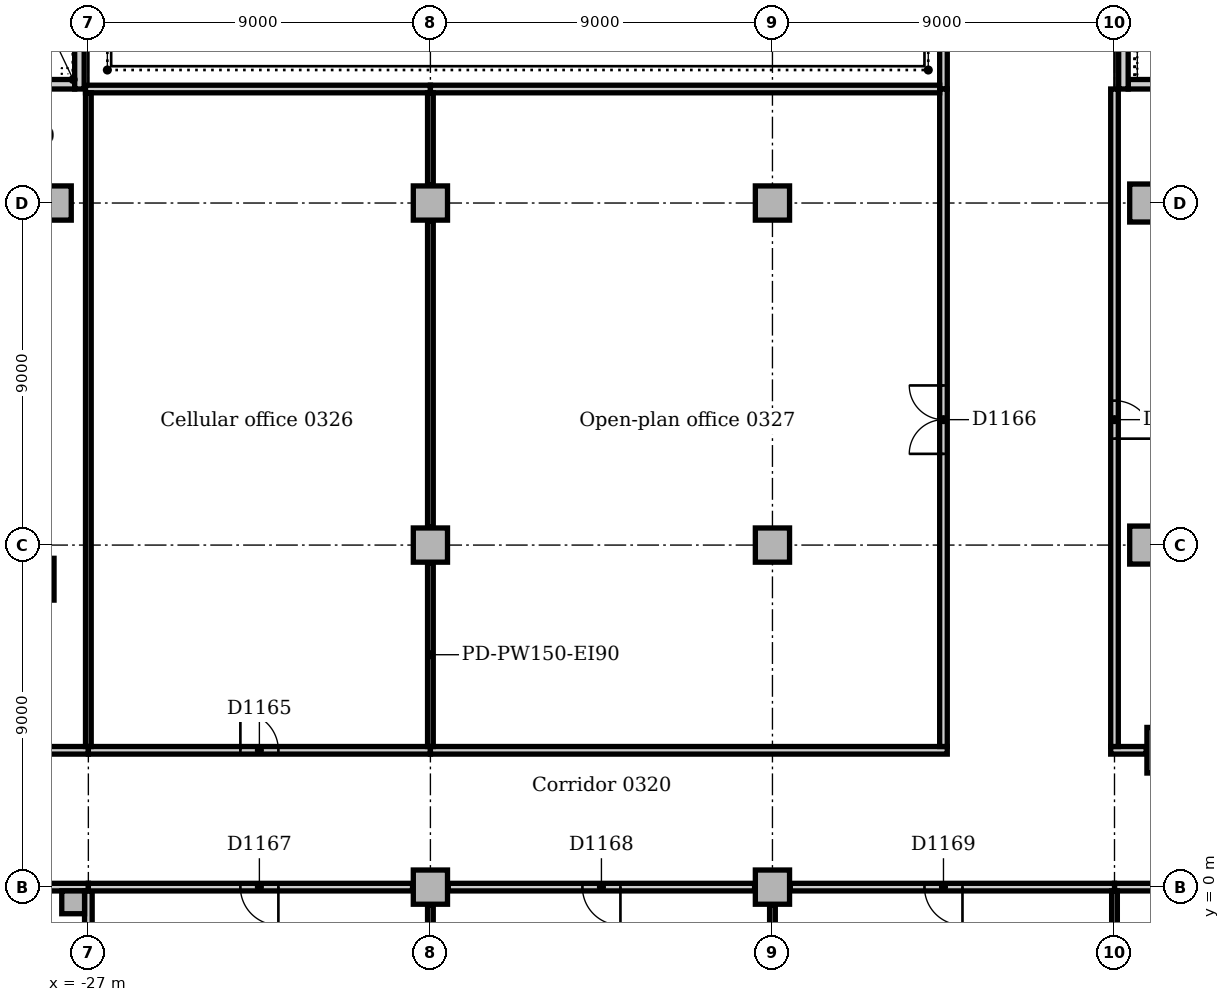
"""IFC4 building model, lengths in metres.
Left out: names, types, materials, properties, quantities, classifications, styles, units other than length and angle.
Written with IfcOpenShell. Run it as: python <this file> out.ifc"""

import sys

from ifc_helpers import new_model, si_unit, direction, frame, frame_2d, origin, origin_with_axes, origin_2d, place, context, subcontext, project, spatial, rectangle, extrude, element, fill, save


model = new_model("IFC4")
c1 = context("Model", 3, precision=1e-05, world=origin(), true_north=direction((0.0, 1.0)))
c2 = subcontext(c1, "Body", "Model", "MODEL_VIEW")
j1 = project(units=[si_unit("LENGTHUNIT", "METRE"), si_unit("PLANEANGLEUNIT", "RADIAN")], contexts=[c1])
p1 = place(None, origin())
s1 = spatial("IfcSite", under=j1, at=p1, CompositionType="ELEMENT")
p2 = place(p1, origin())
s2 = spatial("IfcBuilding", under=s1, at=p2, CompositionType="ELEMENT")
p3 = place(p2, frame((0.0, 0.0, 16.0)))
s3 = spatial("IfcBuildingStorey", under=s2, at=p3, CompositionType="ELEMENT", Elevation=16.0)
p4 = place(p3, frame((0.36, 21.125, 0.0), z_axis=(0.0, 0.0, 1.0), x_axis=(1.0, 0.0, 0.0)))
e1 = element("IfcWall", 1, at=p4, inside=s3, PredefinedType="SOLIDWALL", context=c2, shape_type="SweptSolid", body=[
    extrude(rectangle(XDim=3.54, YDim=0.25, at=frame_2d((1.77, 0.0))), origin(), (0.0, 0.0, 1.0), 5.0),
])
p5 = place(p3, frame((0.235, 21.0, 0.0), z_axis=(0.0, 0.0, 1.0), x_axis=(0.0, 1.0, 0.0)))
e2 = element("IfcWall", 2, at=p5, inside=s3, PredefinedType="SOLIDWALL", context=c2, shape_type="SweptSolid", body=[
    extrude(rectangle(XDim=21.0, YDim=0.25, at=frame_2d((10.5, 0.0))), origin(), (0.0, 0.0, 1.0), 5.0),
])
p6 = place(p3, frame((1.453, 3.602, 0.0), z_axis=(0.0, 0.0, 1.0), x_axis=(1.0, 0.0, 0.0)))
e3 = element("IfcColumn", 3, at=p6, inside=s3, PredefinedType="COLUMN", context=c2, shape_type="SweptSolid", body=[
    extrude(rectangle(XDim=1.2, YDim=1.2, at=origin_2d()), origin(), (0.0, 0.0, 1.0), 4.7),
])
for number, where, z_axis, x_axis in (
    (4, (0.9, 9.0, 0.0), (0.0, 0.0, 1.0), (1.0, 0.0, 0.0)),
    (5, (0.9, 18.0, 0.0), (0.0, 0.0, 1.0), (1.0, 0.0, 0.0)),
):
    element("IfcColumn", number, at=place(p3, frame(where, z_axis=z_axis, x_axis=x_axis)), inside=s3, PredefinedType="COLUMN", context=c2, shape_type="SweptSolid", body=[
        extrude(rectangle(XDim=1.0, YDim=1.0, at=origin_2d()), origin(), (0.0, 0.0, 1.0), 4.7),
    ])
p7 = place(p3, frame((-30.9, 21.125, 0.0), z_axis=(0.0, 0.0, 1.0), x_axis=(1.0, 0.0, 0.0)))
e6 = element("IfcWall", 6, at=p7, inside=s3, PredefinedType="SOLIDWALL", context=c2, shape_type="SweptSolid", body=[
    extrude(rectangle(XDim=3.54, YDim=0.25, at=frame_2d((1.77, 0.0))), origin(), (0.0, 0.0, 1.0), 5.0),
])
p8 = place(p3, frame((-27.235, 21.0, 0.0), z_axis=(0.0, 0.0, 1.0), x_axis=(0.0, 1.0, 0.0)))
e7 = element("IfcWall", 7, at=p8, inside=s3, PredefinedType="SOLIDWALL", context=c2, shape_type="SweptSolid", body=[
    extrude(rectangle(XDim=6.65, YDim=0.25, at=frame_2d((3.325, 0.0))), origin(), (0.0, 0.0, 1.0), 5.0),
])
p9 = place(p3, frame((-28.453, 8.102, 0.0), z_axis=(0.0, 0.0, 1.0), x_axis=(1.0, 0.0, 0.0)))
e8 = element("IfcColumn", 8, at=p9, inside=s3, PredefinedType="COLUMN", context=c2, shape_type="SweptSolid", body=[
    extrude(rectangle(XDim=1.1, YDim=1.1, at=origin_2d()), origin(), (0.0, 0.0, 1.0), 4.7),
])
for number, where, z_axis, x_axis in (
    (9, (-27.9, 18.0, 0.0), (0.0, 0.0, 1.0), (1.0, 0.0, 0.0)),
    (10, (-18.0, 0.0, 0.0), (0.0, 0.0, 1.0), (1.0, 0.0, 0.0)),
    (11, (-18.0, 9.0, 0.0), (0.0, 0.0, 1.0), (1.0, 0.0, 0.0)),
    (12, (-18.0, 18.0, 0.0), (0.0, 0.0, 1.0), (1.0, 0.0, 0.0)),
    (13, (-9.0, 0.0, 0.0), (0.0, 0.0, 1.0), (1.0, 0.0, 0.0)),
    (14, (-9.0, 9.0, 0.0), (0.0, 0.0, 1.0), (1.0, 0.0, 0.0)),
    (15, (-9.0, 18.0, 0.0), (0.0, 0.0, 1.0), (1.0, 0.0, 0.0)),
):
    element("IfcColumn", number, at=place(p3, frame(where, z_axis=z_axis, x_axis=x_axis)), inside=s3, PredefinedType="COLUMN", context=c2, shape_type="SweptSolid", body=[
        extrude(rectangle(XDim=0.9, YDim=0.9, at=origin_2d()), origin(), (0.0, 0.0, 1.0), 4.7),
    ])
p10 = place(p3, frame((-27.4, -0.4, 0.0), z_axis=(0.0, 0.0, 1.0), x_axis=(1.0, 0.0, 0.0)))
e16 = element("IfcColumn", 16, at=p10, inside=s3, PredefinedType="COLUMN", context=c2, shape_type="SweptSolid", body=[
    extrude(rectangle(XDim=0.6, YDim=0.6, at=origin_2d()), origin(), (0.0, 0.0, 1.0), 5.0),
])
p11 = place(p3, frame((-36.0, 0.0, 0.0), z_axis=(0.0, 0.0, 1.0), x_axis=(1.0, 0.0, 0.0)))
e17 = element("IfcWall", 17, at=p11, inside=s3, PredefinedType="SOLIDWALL", context=c2, shape_type="SweptSolid", body=[
    extrude(rectangle(XDim=9.0, YDim=0.2, at=frame_2d((4.5, 0.0))), origin(), (0.0, 0.0, 1.0), 4.7),
])
p12 = place(p11, frame((0.8, 0.0, 0.0)))
e18 = element("IfcOpeningElement", 18, at=p12, cuts=e17, PredefinedType="OPENING", context=c2, shape_type="SweptSolid", body=[
    extrude(rectangle(XDim=1.2, YDim=2.1, at=frame_2d((0.6, 1.05))), frame((0.0, 0.11, 0.0), z_axis=(0.0, -1.0, 0.0), x_axis=(1.0, 0.0, 0.0)), (0.0, 0.0, 1.0), 0.22),
])
p13 = place(p3, frame((-27.0, -4.65, 0.0), z_axis=(0.0, 0.0, 1.0), x_axis=(0.0, 1.0, 0.0)))
e19 = element("IfcWall", 19, at=p13, inside=s3, PredefinedType="SOLIDWALL", context=c2, shape_type="SweptSolid", body=[
    extrude(rectangle(XDim=4.55, YDim=0.2, at=frame_2d((2.275, 0.0))), origin(), (0.0, 0.0, 1.0), 4.7),
])
p14 = place(p3, frame((-36.0, 3.6, 0.0), z_axis=(0.0, 0.0, 1.0), x_axis=(1.0, 0.0, 0.0)))
e20 = element("IfcWall", 20, at=p14, inside=s3, PredefinedType="PARTITIONING", context=c2, shape_type="SweptSolid", body=[
    extrude(rectangle(XDim=9.0, YDim=0.2, at=frame_2d((4.5, 0.0))), origin(), (0.0, 0.0, 1.0), 4.7),
])
p15 = place(p14, frame((4.0, 0.0, 0.0)))
e21 = element("IfcOpeningElement", 21, at=p15, cuts=e20, PredefinedType="OPENING", context=c2, shape_type="SweptSolid", body=[
    extrude(rectangle(XDim=1.0, YDim=2.1, at=frame_2d((0.5, 1.05))), frame((0.0, 0.11, 0.0), z_axis=(0.0, -1.0, 0.0), x_axis=(1.0, 0.0, 0.0)), (0.0, 0.0, 1.0), 0.22),
])
p16 = place(p3, origin_with_axes())
e22 = element("IfcWall", 22, at=p16, inside=s3, PredefinedType="PARTITIONING", context=c2, shape_type="SweptSolid", body=[
    extrude(rectangle(XDim=9.0, YDim=0.2, at=frame_2d((4.5, 0.0))), origin(), (0.0, 0.0, 1.0), 4.7),
])
p17 = place(p16, frame((4.3, 0.0, 0.0)))
e23 = element("IfcOpeningElement", 23, at=p17, cuts=e22, PredefinedType="OPENING", context=c2, shape_type="SweptSolid", body=[
    extrude(rectangle(XDim=1.0, YDim=2.1, at=frame_2d((0.5, 1.05))), frame((0.0, 0.11, 0.0), z_axis=(0.0, -1.0, 0.0), x_axis=(1.0, 0.0, 0.0)), (0.0, 0.0, 1.0), 0.22),
])
p18 = place(p3, frame((-0.1, 3.6, 0.0), z_axis=(0.0, 0.0, 1.0), x_axis=(1.0, 0.0, 0.0)))
e24 = element("IfcWall", 24, at=p18, inside=s3, PredefinedType="PARTITIONING", context=c2, shape_type="SweptSolid", body=[
    extrude(rectangle(XDim=0.933, YDim=0.2, at=frame_2d((0.467, 0.0))), origin(), (0.0, 0.0, 1.0), 4.7),
])
p19 = place(p3, frame((-27.0, 3.6, 0.0), z_axis=(0.0, 0.0, 1.0), x_axis=(1.0, 0.0, 0.0)))
e25 = element("IfcWall", 25, at=p19, inside=s3, PredefinedType="PARTITIONING", context=c2, shape_type="SweptSolid", body=[
    extrude(rectangle(XDim=9.0, YDim=0.2, at=frame_2d((4.5, 0.0))), origin(), (0.0, 0.0, 1.0), 4.7),
])
p20 = place(p19, frame((4.0, 0.0, 0.0)))
e26 = element("IfcOpeningElement", 26, at=p20, cuts=e25, PredefinedType="OPENING", context=c2, shape_type="SweptSolid", body=[
    extrude(rectangle(XDim=1.0, YDim=2.1, at=frame_2d((0.5, 1.05))), frame((0.0, 0.11, 0.0), z_axis=(0.0, -1.0, 0.0), x_axis=(1.0, 0.0, 0.0)), (0.0, 0.0, 1.0), 0.22),
])
p21 = place(p3, frame((-18.0, 3.6, 0.0), z_axis=(0.0, 0.0, 1.0), x_axis=(1.0, 0.0, 0.0)))
e27 = element("IfcWall", 27, at=p21, inside=s3, PredefinedType="PARTITIONING", context=c2, shape_type="SweptSolid", body=[
    extrude(rectangle(XDim=13.6, YDim=0.2, at=frame_2d((6.8, 0.0))), origin(), (0.0, 0.0, 1.0), 4.7),
])
p22 = place(p3, frame((-27.0, 0.0, 0.0), z_axis=(0.0, 0.0, 1.0), x_axis=(1.0, 0.0, 0.0)))
e28 = element("IfcWall", 28, at=p22, inside=s3, PredefinedType="PARTITIONING", context=c2, shape_type="SweptSolid", body=[
    extrude(rectangle(XDim=8.53, YDim=0.2, at=frame_2d((4.265, 0.0))), origin(), (0.0, 0.0, 1.0), 4.7),
])
p23 = place(p22, frame((4.0, 0.0, 0.0)))
e29 = element("IfcOpeningElement", 29, at=p23, cuts=e28, PredefinedType="OPENING", context=c2, shape_type="SweptSolid", body=[
    extrude(rectangle(XDim=1.0, YDim=2.1, at=frame_2d((0.5, 1.05))), frame((0.0, 0.11, 0.0), z_axis=(0.0, -1.0, 0.0), x_axis=(1.0, 0.0, 0.0)), (0.0, 0.0, 1.0), 0.22),
])
p24 = place(p3, frame((-17.53, 0.0, 0.0), z_axis=(0.0, 0.0, 1.0), x_axis=(1.0, 0.0, 0.0)))
e30 = element("IfcWall", 30, at=p24, inside=s3, PredefinedType="PARTITIONING", context=c2, shape_type="SweptSolid", body=[
    extrude(rectangle(XDim=8.06, YDim=0.2, at=frame_2d((4.03, 0.0))), origin(), (0.0, 0.0, 1.0), 4.7),
])
p25 = place(p24, frame((3.53, 0.0, 0.0)))
e31 = element("IfcOpeningElement", 31, at=p25, cuts=e30, PredefinedType="OPENING", context=c2, shape_type="SweptSolid", body=[
    extrude(rectangle(XDim=1.0, YDim=2.1, at=frame_2d((0.5, 1.05))), frame((0.0, 0.11, 0.0), z_axis=(0.0, -1.0, 0.0), x_axis=(1.0, 0.0, 0.0)), (0.0, 0.0, 1.0), 0.22),
])
p26 = place(p3, frame((-8.53, 0.0, 0.0), z_axis=(0.0, 0.0, 1.0), x_axis=(1.0, 0.0, 0.0)))
e32 = element("IfcWall", 32, at=p26, inside=s3, PredefinedType="PARTITIONING", context=c2, shape_type="SweptSolid", body=[
    extrude(rectangle(XDim=8.53, YDim=0.2, at=frame_2d((4.265, 0.0))), origin(), (0.0, 0.0, 1.0), 4.7),
])
p27 = place(p26, frame((3.53, 0.0, 0.0)))
e33 = element("IfcOpeningElement", 33, at=p27, cuts=e32, PredefinedType="OPENING", context=c2, shape_type="SweptSolid", body=[
    extrude(rectangle(XDim=1.0, YDim=2.1, at=frame_2d((0.5, 1.05))), frame((0.0, 0.11, 0.0), z_axis=(0.0, -1.0, 0.0), x_axis=(1.0, 0.0, 0.0)), (0.0, 0.0, 1.0), 0.22),
])
p28 = place(p3, frame((-4.5, 21.0, 0.0), z_axis=(0.0, 0.0, 1.0), x_axis=(0.0, 1.0, 0.0)))
e34 = element("IfcWall", 34, at=p28, inside=s3, PredefinedType="PARTITIONING", context=c2, shape_type="SweptSolid", body=[
    extrude(rectangle(XDim=24.0, YDim=0.2, at=frame_2d((12.0, 0.0))), origin(), (0.0, 0.0, 1.0), 4.7),
])
p29 = place(p3, frame((-4.5, 3.7, 0.0), z_axis=(0.0, 0.0, 1.0), x_axis=(0.0, 1.0, 0.0)))
e35 = element("IfcWall", 35, at=p29, inside=s3, PredefinedType="PARTITIONING", context=c2, shape_type="SweptSolid", body=[
    extrude(rectangle(XDim=17.3, YDim=0.2, at=frame_2d((8.65, 0.0))), origin(), (0.0, 0.0, 1.0), 4.7),
])
p30 = place(p29, frame((7.7, 0.0, 0.0)))
e36 = element("IfcOpeningElement", 36, at=p30, cuts=e35, PredefinedType="OPENING", context=c2, shape_type="SweptSolid", body=[
    extrude(rectangle(XDim=1.8, YDim=2.1, at=frame_2d((0.9, 1.05))), frame((0.0, 0.11, 0.0), z_axis=(0.0, -1.0, 0.0), x_axis=(1.0, 0.0, 0.0)), (0.0, 0.0, 1.0), 0.22),
])
p31 = place(p3, frame((0.0, 3.7, 0.0), z_axis=(0.0, 0.0, 1.0), x_axis=(0.0, 1.0, 0.0)))
e37 = element("IfcWall", 37, at=p31, inside=s3, PredefinedType="PARTITIONING", context=c2, shape_type="SweptSolid", body=[
    extrude(rectangle(XDim=17.3, YDim=0.2, at=frame_2d((8.65, 0.0))), origin(), (0.0, 0.0, 1.0), 4.7),
])
p32 = place(p31, frame((8.1, 0.0, 0.0)))
e38 = element("IfcOpeningElement", 38, at=p32, cuts=e37, PredefinedType="OPENING", context=c2, shape_type="SweptSolid", body=[
    extrude(rectangle(XDim=1.0, YDim=2.1, at=frame_2d((0.5, 1.05))), frame((0.0, 0.11, 0.0), z_axis=(0.0, -1.0, 0.0), x_axis=(1.0, 0.0, 0.0)), (0.0, 0.0, 1.0), 0.22),
])
p33 = place(p3, frame((-27.075, 21.0, 0.0), z_axis=(0.0, 0.0, 1.0), x_axis=(1.0, 0.0, 0.0)))
e39 = element("IfcWall", 39, at=p33, inside=s3, PredefinedType="PARTITIONING", context=c2, shape_type="SweptSolid", body=[
    extrude(rectangle(XDim=9.075, YDim=0.2, at=frame_2d((4.537, 0.0))), origin(), (0.0, 0.0, 1.0), 4.7),
])
p34 = place(p3, frame((-18.0, 21.0, 0.0), z_axis=(0.0, 0.0, 1.0), x_axis=(1.0, 0.0, 0.0)))
e40 = element("IfcWall", 40, at=p34, inside=s3, PredefinedType="PARTITIONING", context=c2, shape_type="SweptSolid", body=[
    extrude(rectangle(XDim=13.4, YDim=0.2, at=frame_2d((6.7, 0.0))), origin(), (0.0, 0.0, 1.0), 4.7),
])
p35 = place(p3, frame((-18.0, 3.7, 0.0), z_axis=(0.0, 0.0, 1.0), x_axis=(0.0, 1.0, 0.0)))
e41 = element("IfcWall", 41, at=p35, inside=s3, PredefinedType="PARTITIONING", context=c2, shape_type="SweptSolid", body=[
    extrude(rectangle(XDim=4.83, YDim=0.15, at=frame_2d((2.415, 0.0))), origin(), (0.0, 0.0, 1.0), 4.7),
])
p36 = place(p3, frame((-18.0, 9.47, 0.0), z_axis=(0.0, 0.0, 1.0), x_axis=(0.0, 1.0, 0.0)))
e42 = element("IfcWall", 42, at=p36, inside=s3, PredefinedType="PARTITIONING", context=c2, shape_type="SweptSolid", body=[
    extrude(rectangle(XDim=8.06, YDim=0.15, at=frame_2d((4.03, 0.0))), origin(), (0.0, 0.0, 1.0), 4.7),
])
p37 = place(p3, frame((-18.0, 18.47, 0.0), z_axis=(0.0, 0.0, 1.0), x_axis=(0.0, 1.0, 0.0)))
e43 = element("IfcWall", 43, at=p37, inside=s3, PredefinedType="PARTITIONING", context=c2, shape_type="SweptSolid", body=[
    extrude(rectangle(XDim=2.43, YDim=0.15, at=frame_2d((1.215, 0.0))), origin(), (0.0, 0.0, 1.0), 4.7),
])
p38 = place(p3, frame((-27.0, 3.7, 0.0), z_axis=(0.0, 0.0, 1.0), x_axis=(0.0, 1.0, 0.0)))
e44 = element("IfcWall", 44, at=p38, inside=s3, PredefinedType="PARTITIONING", context=c2, shape_type="SweptSolid", body=[
    extrude(rectangle(XDim=17.2, YDim=0.15, at=frame_2d((8.6, 0.0))), origin(), (0.0, 0.0, 1.0), 4.7),
])
for number, where, z_axis, x_axis in (
    (45, (-18.0, -8.53, 0.0), (0.0, 0.0, 1.0), (0.0, 1.0, 0.0)),
    (46, (-9.0, -8.53, 0.0), (0.0, 0.0, 1.0), (0.0, 1.0, 0.0)),
):
    element("IfcWall", number, at=place(p3, frame(where, z_axis=z_axis, x_axis=x_axis)), inside=s3, PredefinedType="PARTITIONING", context=c2, shape_type="SweptSolid", body=[
        extrude(rectangle(XDim=8.06, YDim=0.15, at=frame_2d((4.03, 0.0))), origin(), (0.0, 0.0, 1.0), 4.7),
    ])
p39 = place(p3, frame((0.0, -8.53, 0.0), z_axis=(0.0, 0.0, 1.0), x_axis=(0.0, 1.0, 0.0)))
e47 = element("IfcWall", 47, at=p39, inside=s3, PredefinedType="PARTITIONING", context=c2, shape_type="SweptSolid", body=[
    extrude(rectangle(XDim=8.43, YDim=0.15, at=frame_2d((4.215, 0.0))), origin(), (0.0, 0.0, 1.0), 4.7),
])
p40 = place(p3, frame((0.48, 21.25, 0.0), z_axis=(0.0, 0.0, 1.0), x_axis=(0.0, 1.0, 0.0)))
e48 = element("IfcWall", 48, at=p40, inside=s3, PredefinedType="STANDARD", context=c2, shape_type="SweptSolid", body=[
    extrude(rectangle(XDim=1.955, YDim=0.24, at=frame_2d((0.978, 0.0))), origin(), (0.0, 0.0, 1.0), 5.0),
])
p41 = place(p20, origin())
e49 = element("IfcDoor", 49, at=p41, inside=s3, OperationType="SINGLE_SWING_LEFT", PredefinedType="DOOR", context=c2, shape_type="SweptSolid", body=[
    extrude(rectangle(XDim=1.0, YDim=2.1, at=frame_2d((0.5, 1.05))), frame((0.0, 0.025, 0.0), z_axis=(0.0, -1.0, 0.0), x_axis=(1.0, 0.0, 0.0)), (0.0, 0.0, 1.0), 0.05),
])
fill(e26, e49)
p42 = place(p30, origin())
e50 = element("IfcDoor", 50, at=p42, inside=s3, OperationType="DOUBLE_DOOR_SINGLE_SWING", PredefinedType="DOOR", context=c2, shape_type="SweptSolid", body=[
    extrude(rectangle(XDim=1.8, YDim=2.1, at=frame_2d((0.9, 1.05))), frame((0.0, 0.025, 0.0), z_axis=(0.0, -1.0, 0.0), x_axis=(1.0, 0.0, 0.0)), (0.0, 0.0, 1.0), 0.05),
])
fill(e36, e50)
p43 = place(p23, frame((1.0, 0.0, 0.0), z_axis=(0.0, 0.0, 1.0), x_axis=(-1.0, 0.0, 0.0)))
e51 = element("IfcDoor", 51, at=p43, inside=s3, OperationType="SINGLE_SWING_LEFT", PredefinedType="DOOR", context=c2, shape_type="SweptSolid", body=[
    extrude(rectangle(XDim=1.0, YDim=2.1, at=frame_2d((0.5, 1.05))), frame((0.0, 0.025, 0.0), z_axis=(0.0, -1.0, 0.0), x_axis=(1.0, 0.0, 0.0)), (0.0, 0.0, 1.0), 0.05),
])
fill(e29, e51)
p44 = place(p25, frame((1.0, 0.0, 0.0), z_axis=(0.0, 0.0, 1.0), x_axis=(-1.0, 0.0, 0.0)))
e52 = element("IfcDoor", 52, at=p44, inside=s3, OperationType="SINGLE_SWING_LEFT", PredefinedType="DOOR", context=c2, shape_type="SweptSolid", body=[
    extrude(rectangle(XDim=1.0, YDim=2.1, at=frame_2d((0.5, 1.05))), frame((0.0, 0.025, 0.0), z_axis=(0.0, -1.0, 0.0), x_axis=(1.0, 0.0, 0.0)), (0.0, 0.0, 1.0), 0.05),
])
fill(e31, e52)
p45 = place(p27, frame((1.0, 0.0, 0.0), z_axis=(0.0, 0.0, 1.0), x_axis=(-1.0, 0.0, 0.0)))
e53 = element("IfcDoor", 53, at=p45, inside=s3, OperationType="SINGLE_SWING_LEFT", PredefinedType="DOOR", context=c2, shape_type="SweptSolid", body=[
    extrude(rectangle(XDim=1.0, YDim=2.1, at=frame_2d((0.5, 1.05))), frame((0.0, 0.025, 0.0), z_axis=(0.0, -1.0, 0.0), x_axis=(1.0, 0.0, 0.0)), (0.0, 0.0, 1.0), 0.05),
])
fill(e33, e53)
p46 = place(p32, frame((1.0, 0.0, 0.0), z_axis=(0.0, 0.0, 1.0), x_axis=(-1.0, 0.0, 0.0)))
e54 = element("IfcDoor", 54, at=p46, inside=s3, OperationType="SINGLE_SWING_RIGHT", PredefinedType="DOOR", context=c2, shape_type="SweptSolid", body=[
    extrude(rectangle(XDim=1.0, YDim=2.1, at=frame_2d((0.5, 1.05))), frame((0.0, 0.025, 0.0), z_axis=(0.0, -1.0, 0.0), x_axis=(1.0, 0.0, 0.0)), (0.0, 0.0, 1.0), 0.05),
])
fill(e38, e54)
save(model, sys.argv[1])
